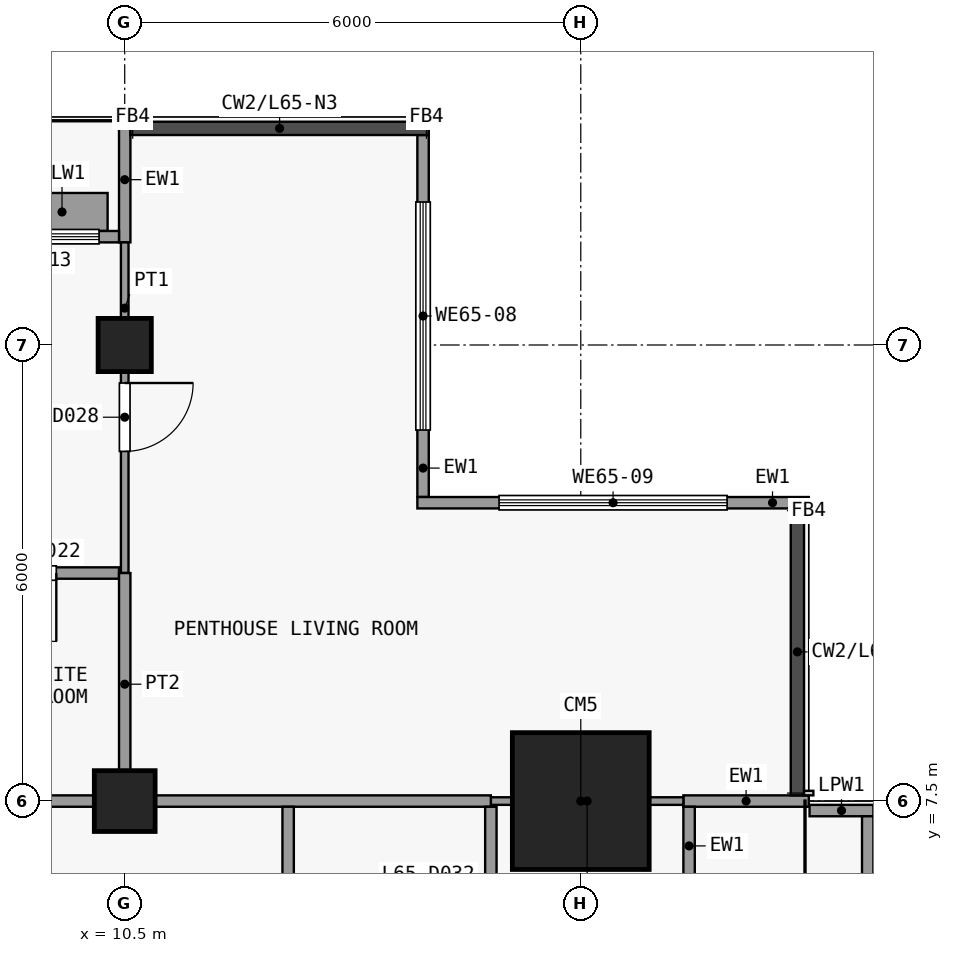
"""IFC4 building model, lengths in metres.
Left out: names, types, materials, properties, quantities, classifications, styles, units other than length and angle.
Written with IfcOpenShell. Run it as: python <this file> out.ifc"""

import sys

from ifc_helpers import new_model, si_unit, direction, frame, frame_2d, origin, origin_2d, place, context, subcontext, project, spatial, rectangle, extrude, element, fill, save


model = new_model("IFC4")
c1 = context("Model", 3, precision=1e-05, world=origin(), true_north=direction((0.0, 1.0)))
c2 = subcontext(c1, "Body", "Model", "MODEL_VIEW")
j1 = project(units=[si_unit("LENGTHUNIT", "METRE"), si_unit("PLANEANGLEUNIT", "RADIAN")], contexts=[c1])
p1 = place(None, origin())
s1 = spatial("IfcSite", under=j1, at=p1, CompositionType="ELEMENT")
p2 = place(p1, origin())
s2 = spatial("IfcBuilding", under=s1, at=p2, CompositionType="ELEMENT")
p3 = place(p2, frame((0.0, 0.0, 259.1)))
s3 = spatial("IfcBuildingStorey", under=s2, at=p3, CompositionType="ELEMENT", Elevation=259.1)
p4 = place(p3, frame((10.5, 7.5, 0.0), z_axis=(0.0, 0.0, 1.0), x_axis=(1.0, 0.0, 0.0)))
e1 = element("IfcColumn", 1, at=p4, inside=s3, PredefinedType="COLUMN", context=c2, shape_type="SweptSolid", body=[
    extrude(rectangle(XDim=0.8, YDim=0.8, at=origin_2d()), origin(), (0.0, 0.0, 1.0), 3.6),
])
p5 = place(p3, frame((10.5, 13.5, 0.0), z_axis=(0.0, 0.0, 1.0), x_axis=(1.0, 0.0, 0.0)))
e2 = element("IfcColumn", 2, at=p5, inside=s3, PredefinedType="COLUMN", context=c2, shape_type="SweptSolid", body=[
    extrude(rectangle(XDim=0.7, YDim=0.7, at=origin_2d()), origin(), (0.0, 0.0, 1.0), 3.6),
])
p6 = place(p3, frame((16.5, 7.5, 0.0), z_axis=(0.0, 0.0, 1.0), x_axis=(1.0, 0.0, 0.0)))
e3 = element("IfcColumn", 3, at=p6, inside=s3, PredefinedType="COLUMN", context=c2, shape_type="SweptSolid", body=[
    extrude(rectangle(XDim=1.8, YDim=1.8, at=origin_2d()), origin(), (0.0, 0.0, 1.0), 3.6),
])
p7 = place(p3, frame((14.425, 16.262, 0.0), z_axis=(0.0, 0.0, 1.0), x_axis=(0.0, -1.0, 0.0)))
e4 = element("IfcWall", 4, at=p7, inside=s3, PredefinedType="SOLIDWALL", context=c2, shape_type="SweptSolid", body=[
    extrude(rectangle(XDim=4.762, YDim=0.15, at=frame_2d((2.381, 0.0))), origin(), (0.0, 0.0, 1.0), 3.3),
])
p8 = place(p7, frame((0.881, 0.0, 0.9)))
e5 = element("IfcOpeningElement", 5, at=p8, cuts=e4, PredefinedType="OPENING", context=c2, shape_type="SweptSolid", body=[
    extrude(rectangle(XDim=3.0, YDim=2.4, at=frame_2d((1.5, 1.2))), frame((0.0, 0.085, 0.0), z_axis=(0.0, -1.0, 0.0), x_axis=(1.0, 0.0, 0.0)), (0.0, 0.0, 1.0), 0.17),
])
p9 = place(p3, frame((14.35, 11.425, 0.0), z_axis=(0.0, 0.0, 1.0), x_axis=(1.0, 0.0, 0.0)))
e6 = element("IfcWall", 6, at=p9, inside=s3, PredefinedType="SOLIDWALL", context=c2, shape_type="SweptSolid", body=[
    extrude(rectangle(XDim=5.15, YDim=0.15, at=frame_2d((2.575, 0.0))), origin(), (0.0, 0.0, 1.0), 3.3),
])
p10 = place(p9, frame((1.075, 0.0, 0.9)))
e7 = element("IfcOpeningElement", 7, at=p10, cuts=e6, PredefinedType="OPENING", context=c2, shape_type="SweptSolid", body=[
    extrude(rectangle(XDim=3.0, YDim=2.4, at=frame_2d((1.5, 1.2))), frame((0.0, 0.085, 0.0), z_axis=(0.0, -1.0, 0.0), x_axis=(1.0, 0.0, 0.0)), (0.0, 0.0, 1.0), 0.17),
])
p11 = place(p3, frame((10.5, 14.85, 0.0), z_axis=(0.0, 0.0, 1.0), x_axis=(0.0, 1.0, 0.0)))
e8 = element("IfcWall", 8, at=p11, inside=s3, PredefinedType="SOLIDWALL", context=c2, shape_type="SweptSolid", body=[
    extrude(rectangle(XDim=1.65, YDim=0.15, at=frame_2d((0.825, 0.0))), origin(), (0.0, 0.0, 1.0), 3.3),
])
p12 = place(p3, frame((4.575, 14.925, 0.0), z_axis=(0.0, 0.0, 1.0), x_axis=(1.0, 0.0, 0.0)))
e9 = element("IfcWall", 9, at=p12, inside=s3, PredefinedType="SOLIDWALL", context=c2, shape_type="SweptSolid", body=[
    extrude(rectangle(XDim=5.85, YDim=0.15, at=frame_2d((2.925, 0.0))), origin(), (0.0, 0.0, 1.0), 3.3),
])
p13 = place(p12, frame((2.325, 0.0, 0.0)))
e10 = element("IfcOpeningElement", 10, at=p13, cuts=e9, PredefinedType="OPENING", context=c2, shape_type="SweptSolid", body=[
    extrude(rectangle(XDim=1.2, YDim=2.4, at=frame_2d((0.6, 1.2))), frame((0.0, 0.085, 0.0), z_axis=(0.0, -1.0, 0.0), x_axis=(1.0, 0.0, 0.0)), (0.0, 0.0, 1.0), 0.17),
])
p14 = place(p12, frame((0.262, 0.0, 0.9)))
e11 = element("IfcOpeningElement", 11, at=p14, cuts=e9, PredefinedType="OPENING", context=c2, shape_type="SweptSolid", body=[
    extrude(rectangle(XDim=1.8, YDim=2.1, at=frame_2d((0.9, 1.05))), frame((0.0, 0.085, 0.0), z_axis=(0.0, -1.0, 0.0), x_axis=(1.0, 0.0, 0.0)), (0.0, 0.0, 1.0), 0.17),
])
p15 = place(p12, frame((3.788, 0.0, 0.9)))
e12 = element("IfcOpeningElement", 12, at=p15, cuts=e9, PredefinedType="OPENING", context=c2, shape_type="SweptSolid", body=[
    extrude(rectangle(XDim=1.8, YDim=2.1, at=frame_2d((0.9, 1.05))), frame((0.0, 0.085, 0.0), z_axis=(0.0, -1.0, 0.0), x_axis=(1.0, 0.0, 0.0)), (0.0, 0.0, 1.0), 0.17),
])
p16 = place(p3, frame((9.075, 15.25, 0.0), z_axis=(0.0, 0.0, 1.0), x_axis=(1.0, 0.0, 0.0)))
e13 = element("IfcWall", 13, at=p16, inside=s3, PredefinedType="USERDEFINED", context=c2, shape_type="SweptSolid", body=[
    extrude(rectangle(XDim=1.2, YDim=0.5, at=frame_2d((0.6, 0.0))), origin(), (0.0, 0.0, 1.0), 0.9),
])
p17 = place(p3, frame((17.85, 7.5, 0.0), z_axis=(0.0, 0.0, 1.0), x_axis=(1.0, 0.0, 0.0)))
e14 = element("IfcWall", 14, at=p17, inside=s3, PredefinedType="SOLIDWALL", context=c2, shape_type="SweptSolid", body=[
    extrude(rectangle(XDim=1.65, YDim=0.15, at=frame_2d((0.825, 0.0))), origin(), (0.0, 0.0, 1.0), 3.3),
])
p18 = place(p3, frame((17.925, 7.425, 0.0), z_axis=(0.0, 0.0, 1.0), x_axis=(0.0, -1.0, 0.0)))
e15 = element("IfcWall", 15, at=p18, inside=s3, PredefinedType="SOLIDWALL", context=c2, shape_type="SweptSolid", body=[
    extrude(rectangle(XDim=5.85, YDim=0.15, at=frame_2d((2.925, 0.0))), origin(), (0.0, 0.0, 1.0), 3.3),
])
p19 = place(p18, frame((1.15, 0.0, 0.0)))
e16 = element("IfcOpeningElement", 16, at=p19, cuts=e15, PredefinedType="OPENING", context=c2, shape_type="SweptSolid", body=[
    extrude(rectangle(XDim=1.2, YDim=2.4, at=frame_2d((0.6, 1.2))), frame((0.0, 0.085, 0.0), z_axis=(0.0, -1.0, 0.0), x_axis=(1.0, 0.0, 0.0)), (0.0, 0.0, 1.0), 0.17),
])
p20 = place(p18, frame((3.2, 0.0, 0.9)))
e17 = element("IfcOpeningElement", 17, at=p20, cuts=e15, PredefinedType="OPENING", context=c2, shape_type="SweptSolid", body=[
    extrude(rectangle(XDim=1.8, YDim=2.1, at=frame_2d((0.9, 1.05))), frame((0.0, 0.085, 0.0), z_axis=(0.0, -1.0, 0.0), x_axis=(1.0, 0.0, 0.0)), (0.0, 0.0, 1.0), 0.17),
])
p21 = place(p3, frame((19.51, 7.375, 0.0), z_axis=(0.0, 0.0, 1.0), x_axis=(1.0, 0.0, 0.0)))
e18 = element("IfcWall", 18, at=p21, inside=s3, PredefinedType="PARAPET", context=c2, shape_type="SweptSolid", body=[
    extrude(rectangle(XDim=0.84, YDim=0.15, at=frame_2d((0.42, 0.0))), origin(), (0.0, 0.0, 1.0), 1.15),
])
p22 = place(p3, frame((20.275, 7.3, 0.0), z_axis=(0.0, 0.0, 1.0), x_axis=(0.0, -1.0, 0.0)))
e19 = element("IfcWall", 19, at=p22, inside=s3, PredefinedType="PARAPET", context=c2, shape_type="SweptSolid", body=[
    extrude(rectangle(XDim=5.79, YDim=0.15, at=frame_2d((2.895, 0.0))), origin(), (0.0, 0.0, 1.0), 1.15),
])
p23 = place(p3, frame((15.317, 7.5, 0.0), z_axis=(0.0, 0.0, 1.0), x_axis=(1.0, 0.0, 0.0)))
e20 = element("IfcWall", 20, at=p23, inside=s3, PredefinedType="PARTITIONING", context=c2, shape_type="SweptSolid", body=[
    extrude(rectangle(XDim=2.533, YDim=0.1, at=frame_2d((1.267, 0.0))), origin(), (0.0, 0.0, 1.0), 3.3),
])
p24 = place(p3, frame((0.4, 7.5, 0.0), z_axis=(0.0, 0.0, 1.0), x_axis=(1.0, 0.0, 0.0)))
e21 = element("IfcWall", 21, at=p24, inside=s3, PredefinedType="PARTITIONING", context=c2, shape_type="SweptSolid", body=[
    extrude(rectangle(XDim=14.917, YDim=0.15, at=frame_2d((7.458, 0.0))), origin(), (0.0, 0.0, 1.0), 3.3),
])
p25 = place(p3, frame((7.8, 10.5, 0.0), z_axis=(0.0, 0.0, 1.0), x_axis=(1.0, 0.0, 0.0)))
e22 = element("IfcWall", 22, at=p25, inside=s3, PredefinedType="PARTITIONING", context=c2, shape_type="SweptSolid", body=[
    extrude(rectangle(XDim=2.625, YDim=0.15, at=frame_2d((1.312, 0.0))), origin(), (0.0, 0.0, 1.0), 3.3),
])
p26 = place(p25, frame((0.9, 0.0, 0.0)))
e23 = element("IfcOpeningElement", 23, at=p26, cuts=e22, PredefinedType="OPENING", context=c2, shape_type="SweptSolid", body=[
    extrude(rectangle(XDim=0.9, YDim=2.1, at=frame_2d((0.45, 1.05))), frame((0.0, 0.085, 0.0), z_axis=(0.0, -1.0, 0.0), x_axis=(1.0, 0.0, 0.0)), (0.0, 0.0, 1.0), 0.17),
])
p27 = place(p3, frame((10.5, 10.5, 0.0), z_axis=(0.0, 0.0, 1.0), x_axis=(0.0, 1.0, 0.0)))
e24 = element("IfcWall", 24, at=p27, inside=s3, PredefinedType="PARTITIONING", context=c2, shape_type="SweptSolid", body=[
    extrude(rectangle(XDim=4.35, YDim=0.1, at=frame_2d((2.175, 0.0))), origin(), (0.0, 0.0, 1.0), 3.3),
])
p28 = place(p27, frame((1.6, 0.0, 0.0)))
e25 = element("IfcOpeningElement", 25, at=p28, cuts=e24, PredefinedType="OPENING", context=c2, shape_type="SweptSolid", body=[
    extrude(rectangle(XDim=0.9, YDim=2.1, at=frame_2d((0.45, 1.05))), frame((0.0, 0.06, 0.0), z_axis=(0.0, -1.0, 0.0), x_axis=(1.0, 0.0, 0.0)), (0.0, 0.0, 1.0), 0.12),
])
p29 = place(p3, frame((10.5, 7.575, 0.0), z_axis=(0.0, 0.0, 1.0), x_axis=(0.0, 1.0, 0.0)))
e26 = element("IfcWall", 26, at=p29, inside=s3, PredefinedType="PARTITIONING", context=c2, shape_type="SweptSolid", body=[
    extrude(rectangle(XDim=2.925, YDim=0.15, at=frame_2d((1.462, 0.0))), origin(), (0.0, 0.0, 1.0), 3.3),
])
p30 = place(p3, frame((12.65, 4.6, 0.0), z_axis=(0.0, 0.0, 1.0), x_axis=(0.0, 1.0, 0.0)))
e27 = element("IfcWall", 27, at=p30, inside=s3, PredefinedType="PARTITIONING", context=c2, shape_type="SweptSolid", body=[
    extrude(rectangle(XDim=2.825, YDim=0.15, at=frame_2d((1.413, 0.0))), origin(), (0.0, 0.0, 1.0), 3.3),
])
p31 = place(p30, frame((1.0, 0.0, 0.0)))
e28 = element("IfcOpeningElement", 28, at=p31, cuts=e27, PredefinedType="OPENING", context=c2, shape_type="SweptSolid", body=[
    extrude(rectangle(XDim=0.9, YDim=2.1, at=frame_2d((0.45, 1.05))), frame((0.0, 0.085, 0.0), z_axis=(0.0, -1.0, 0.0), x_axis=(1.0, 0.0, 0.0)), (0.0, 0.0, 1.0), 0.17),
])
p32 = place(p3, frame((15.317, 4.6, 0.0), z_axis=(0.0, 0.0, 1.0), x_axis=(0.0, 1.0, 0.0)))
e29 = element("IfcWall", 29, at=p32, inside=s3, PredefinedType="PARTITIONING", context=c2, shape_type="SweptSolid", body=[
    extrude(rectangle(XDim=2.825, YDim=0.15, at=frame_2d((1.413, 0.0))), origin(), (0.0, 0.0, 1.0), 3.3),
])
p33 = place(p32, frame((1.0, 0.0, 0.0)))
e30 = element("IfcOpeningElement", 30, at=p33, cuts=e29, PredefinedType="OPENING", context=c2, shape_type="SweptSolid", body=[
    extrude(rectangle(XDim=0.9, YDim=2.1, at=frame_2d((0.45, 1.05))), frame((0.0, 0.085, 0.0), z_axis=(0.0, -1.0, 0.0), x_axis=(1.0, 0.0, 0.0)), (0.0, 0.0, 1.0), 0.17),
])
p34 = place(p8, origin())
e31 = element("IfcWindow", 31, at=p34, inside=s3, PartitioningType="SINGLE_PANEL", PredefinedType="WINDOW", context=c2, shape_type="SweptSolid", body=[
    extrude(rectangle(XDim=3.0, YDim=2.4, at=frame_2d((1.5, 1.2))), frame((0.0, 0.03, 0.0), z_axis=(0.0, -1.0, 0.0), x_axis=(1.0, 0.0, 0.0)), (0.0, 0.0, 1.0), 0.06),
])
fill(e5, e31)
p35 = place(p10, origin())
e32 = element("IfcWindow", 32, at=p35, inside=s3, PartitioningType="SINGLE_PANEL", PredefinedType="WINDOW", context=c2, shape_type="SweptSolid", body=[
    extrude(rectangle(XDim=3.0, YDim=2.4, at=frame_2d((1.5, 1.2))), frame((0.0, 0.03, 0.0), z_axis=(0.0, -1.0, 0.0), x_axis=(1.0, 0.0, 0.0)), (0.0, 0.0, 1.0), 0.06),
])
fill(e7, e32)
p36 = place(p15, origin())
e33 = element("IfcWindow", 33, at=p36, inside=s3, PartitioningType="SINGLE_PANEL", PredefinedType="WINDOW", context=c2, shape_type="SweptSolid", body=[
    extrude(rectangle(XDim=1.8, YDim=2.1, at=frame_2d((0.9, 1.05))), frame((0.0, 0.03, 0.0), z_axis=(0.0, -1.0, 0.0), x_axis=(1.0, 0.0, 0.0)), (0.0, 0.0, 1.0), 0.06),
])
fill(e12, e33)
p37 = place(p26, origin())
e34 = element("IfcDoor", 34, at=p37, inside=s3, OperationType="SINGLE_SWING_RIGHT", PredefinedType="DOOR", context=c2, shape_type="SweptSolid", body=[
    extrude(rectangle(XDim=0.9, YDim=2.1, at=frame_2d((0.45, 1.05))), frame((0.0, 0.025, 0.0), z_axis=(0.0, -1.0, 0.0), x_axis=(1.0, 0.0, 0.0)), (0.0, 0.0, 1.0), 0.05),
])
fill(e23, e34)
p38 = place(p28, origin())
e35 = element("IfcDoor", 35, at=p38, inside=s3, OperationType="SINGLE_SWING_RIGHT", PredefinedType="DOOR", context=c2, shape_type="SweptSolid", body=[
    extrude(rectangle(XDim=0.9, YDim=2.1, at=frame_2d((0.45, 1.05))), frame((0.0, 0.025, 0.0), z_axis=(0.0, -1.0, 0.0), x_axis=(1.0, 0.0, 0.0)), (0.0, 0.0, 1.0), 0.05),
])
fill(e25, e35)
save(model, sys.argv[1])
